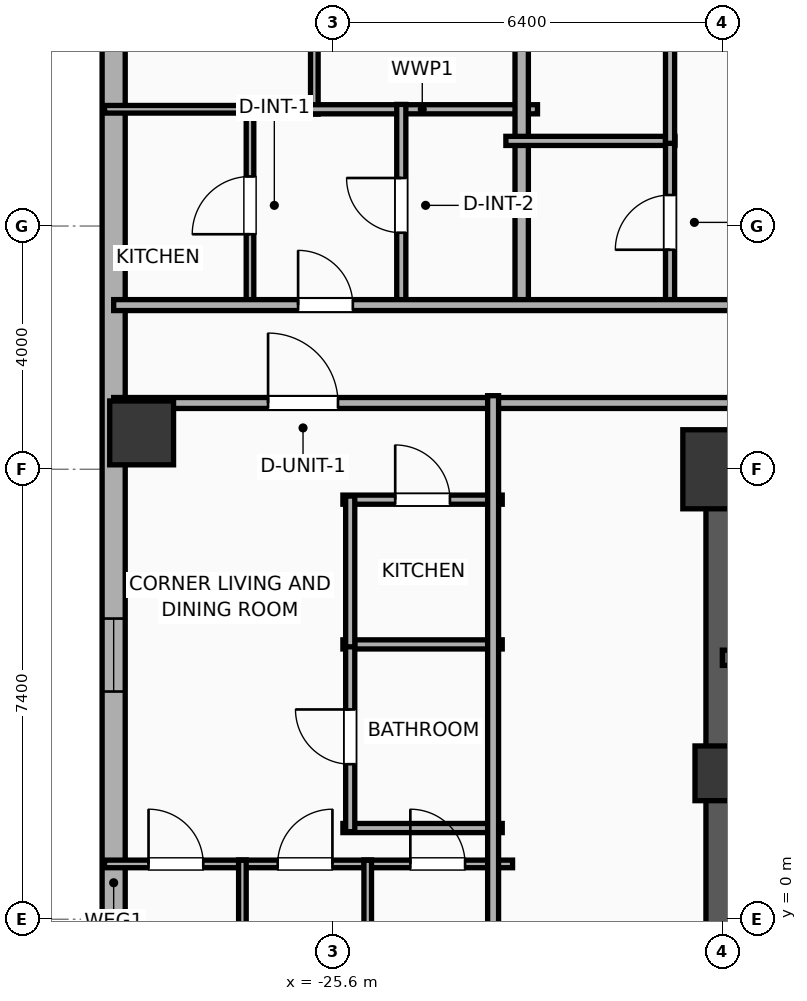
"""IFC4 building model, lengths in metres.
Left out: names, types, materials, properties, quantities, classifications, styles, units other than length and angle.
Written with IfcOpenShell. Run it as: python <this file> out.ifc"""

import sys

from ifc_helpers import new_model, si_unit, direction, frame, frame_2d, origin, origin_2d, place, context, subcontext, project, spatial, rectangle, hollow_rectangle, extrude, element, fill, save


model = new_model("IFC4")
c1 = context("Model", 3, precision=1e-05, world=origin(), true_north=direction((0.0, 1.0)))
c2 = subcontext(c1, "Body", "Model", "MODEL_VIEW")
j1 = project(units=[si_unit("LENGTHUNIT", "METRE"), si_unit("PLANEANGLEUNIT", "RADIAN")], contexts=[c1])
p1 = place(None, origin())
s1 = spatial("IfcSite", under=j1, at=p1, CompositionType="ELEMENT")
p2 = place(p1, origin())
s2 = spatial("IfcBuilding", under=s1, at=p2, CompositionType="ELEMENT")
p3 = place(p2, frame((0.0, 0.0, 128.7)))
s3 = spatial("IfcBuildingStorey", under=s2, at=p3, CompositionType="ELEMENT", Elevation=128.7)
p4 = place(p3, frame((-19.2, 2.4, 0.0), z_axis=(0.0, 0.0, 1.0), x_axis=(1.0, 0.0, 0.0)))
e1 = element("IfcColumn", 1, at=p4, inside=s3, PredefinedType="COLUMN", context=c2, shape_type="SweptSolid", body=[
    extrude(rectangle(XDim=0.9, YDim=0.9, at=origin_2d()), origin(), (0.0, 0.0, 1.0), 3.9),
])
p5 = place(p3, frame((-19.2, 7.4, 0.0), z_axis=(0.0, 0.0, 1.0), x_axis=(1.0, 0.0, 0.0)))
e2 = element("IfcColumn", 2, at=p5, inside=s3, PredefinedType="COLUMN", context=c2, shape_type="SweptSolid", body=[
    extrude(rectangle(XDim=1.3, YDim=1.3, at=origin_2d()), origin(), (0.0, 0.0, 1.0), 3.9),
])
p6 = place(p3, frame((-19.475, 7.4, 0.0), z_axis=(0.0, 0.0, 1.0), x_axis=(1.0, 0.0, 0.0)))
e3 = element("IfcWall", 3, at=p6, inside=s3, PredefinedType="SHEAR", context=c2, shape_type="SweptSolid", body=[
    extrude(rectangle(XDim=7.35, YDim=0.55, at=frame_2d((3.675, 0.0))), origin(), (0.0, 0.0, 1.0), 3.65),
])
p7 = place(p3, frame((-19.145, -7.4, 0.0), z_axis=(0.0, 0.0, 1.0), x_axis=(0.0, 1.0, 0.0)))
e4 = element("IfcWall", 4, at=p7, inside=s3, PredefinedType="SHEAR", context=c2, shape_type="SweptSolid", body=[
    extrude(rectangle(XDim=14.8, YDim=0.65, at=frame_2d((7.4, 0.0))), origin(), (0.0, 0.0, 1.0), 3.65),
])
p8 = place(p3, frame((-28.75, 7.998, 0.0), z_axis=(0.0, 0.0, 1.0), x_axis=(1.0, 0.0, 0.0)))
e5 = element("IfcColumn", 5, at=p8, inside=s3, PredefinedType="COLUMN", context=c2, shape_type="SweptSolid", body=[
    extrude(hollow_rectangle(XDim=1.05, YDim=1.05, WallThickness=0.036, at=origin_2d()), origin(), (0.0, 0.0, 1.0), 3.9),
])
p9 = place(p3, frame((-29.21, -16.581, 0.0), z_axis=(0.0, 0.0, 1.0), x_axis=(0.0, 1.0, 0.0)))
e6 = element("IfcWall", 6, at=p9, inside=s3, PredefinedType="ELEMENTEDWALL", context=c2, shape_type="SweptSolid", body=[
    extrude(rectangle(XDim=34.363, YDim=0.38, at=frame_2d((17.181, 0.0))), origin(), (0.0, 0.0, 1.0), 3.65),
])
p10 = place(p9, frame((31.087, 0.0, 0.75)))
e7 = element("IfcOpeningElement", 7, at=p10, cuts=e6, PredefinedType="OPENING", context=c2, shape_type="SweptSolid", body=[
    extrude(rectangle(XDim=1.2, YDim=2.05, at=frame_2d((0.6, 1.025))), frame((0.0, 0.2, 0.0), z_axis=(0.0, -1.0, 0.0), x_axis=(1.0, 0.0, 0.0)), (0.0, 0.0, 1.0), 0.4),
])
p11 = place(p9, frame((20.326, 0.0, 0.75)))
e8 = element("IfcOpeningElement", 8, at=p11, cuts=e6, PredefinedType="OPENING", context=c2, shape_type="SweptSolid", body=[
    extrude(rectangle(XDim=1.2, YDim=2.05, at=frame_2d((0.6, 1.025))), frame((0.0, 0.2, 0.0), z_axis=(0.0, -1.0, 0.0), x_axis=(1.0, 0.0, 0.0)), (0.0, 0.0, 1.0), 0.4),
])
p12 = place(p9, frame((11.776, 0.0, 0.75)))
e9 = element("IfcOpeningElement", 9, at=p12, cuts=e6, PredefinedType="OPENING", context=c2, shape_type="SweptSolid", body=[
    extrude(rectangle(XDim=1.2, YDim=2.05, at=frame_2d((0.6, 1.025))), frame((0.0, 0.2, 0.0), z_axis=(0.0, -1.0, 0.0), x_axis=(1.0, 0.0, 0.0)), (0.0, 0.0, 1.0), 0.4),
])
p13 = place(p3, frame((-19.2, 4.3, 0.0), z_axis=(0.0, 0.0, 1.0), x_axis=(1.0, 0.0, 0.0)))
e10 = element("IfcWall", 10, at=p13, inside=s3, PredefinedType="SOLIDWALL", context=c2, shape_type="SweptSolid", body=[
    extrude(rectangle(XDim=2.6, YDim=0.25, at=frame_2d((1.3, 0.0))), origin(), (0.0, 0.0, 1.0), 3.65),
])
p14 = place(p3, frame((-29.21, 8.49, 0.0), z_axis=(0.0, 0.0, 1.0), x_axis=(1.0, 0.0, 0.0)))
e11 = element("IfcWall", 11, at=p14, inside=s3, PredefinedType="PARTITIONING", context=c2, shape_type="SweptSolid", body=[
    extrude(rectangle(XDim=19.33, YDim=0.18, at=frame_2d((9.665, 0.0))), origin(), (0.0, 0.0, 1.0), 3.65),
])
p15 = place(p14, frame((2.539, 0.0, 0.0)))
e12 = element("IfcOpeningElement", 12, at=p15, cuts=e11, PredefinedType="OPENING", context=c2, shape_type="SweptSolid", body=[
    extrude(rectangle(XDim=1.15, YDim=2.05, at=frame_2d((0.575, 1.025))), frame((0.0, 0.1, 0.0), z_axis=(0.0, -1.0, 0.0), x_axis=(1.0, 0.0, 0.0)), (0.0, 0.0, 1.0), 0.2),
])
p16 = place(p3, frame((-25.91, 13.24, 0.0), z_axis=(0.0, 0.0, 1.0), x_axis=(0.0, 1.0, 0.0)))
e13 = element("IfcWall", 13, at=p16, inside=s3, PredefinedType="PARTITIONING", context=c2, shape_type="SweptSolid", body=[
    extrude(rectangle(XDim=8.418, YDim=0.125, at=frame_2d((4.209, 0.0))), origin(), (0.0, 0.0, 1.0), 3.65),
])
p17 = place(p16, frame((1.57, 0.0, 0.0)))
e14 = element("IfcOpeningElement", 14, at=p17, cuts=e13, PredefinedType="OPENING", context=c2, shape_type="SweptSolid", body=[
    extrude(rectangle(XDim=0.9, YDim=2.05, at=frame_2d((0.45, 1.025))), frame((0.0, 0.073, 0.0), z_axis=(0.0, -1.0, 0.0), x_axis=(1.0, 0.0, 0.0)), (0.0, 0.0, 1.0), 0.145),
])
p18 = place(p3, frame((-26.03, 13.32, 0.0), z_axis=(0.0, 0.0, 1.0), x_axis=(1.0, 0.0, 0.0)))
e15 = element("IfcWall", 15, at=p18, inside=s3, PredefinedType="PLUMBINGWALL", context=c2, shape_type="SweptSolid", body=[
    extrude(rectangle(XDim=3.79, YDim=0.15, at=frame_2d((1.895, 0.0))), origin(), (0.0, 0.0, 1.0), 3.65),
])
p19 = place(p3, frame((-26.968, 10.08, 0.0), z_axis=(0.0, 0.0, 1.0), x_axis=(0.0, 1.0, 0.0)))
e16 = element("IfcWall", 16, at=p19, inside=s3, PredefinedType="PARTITIONING", context=c2, shape_type="SweptSolid", body=[
    extrude(rectangle(XDim=3.32, YDim=0.125, at=frame_2d((1.66, 0.0))), origin(), (0.0, 0.0, 1.0), 3.65),
])
p20 = place(p19, frame((1.185, 0.0, 0.0)))
e17 = element("IfcOpeningElement", 17, at=p20, cuts=e16, PredefinedType="OPENING", context=c2, shape_type="SweptSolid", body=[
    extrude(rectangle(XDim=0.95, YDim=2.05, at=frame_2d((0.475, 1.025))), frame((0.0, 0.073, 0.0), z_axis=(0.0, -1.0, 0.0), x_axis=(1.0, 0.0, 0.0)), (0.0, 0.0, 1.0), 0.145),
])
p21 = place(p3, frame((-29.36, 13.32, 0.0), z_axis=(0.0, 0.0, 1.0), x_axis=(1.0, 0.0, 0.0)))
e18 = element("IfcWall", 18, at=p21, inside=s3, PredefinedType="PARTITIONING", context=c2, shape_type="SweptSolid", body=[
    extrude(rectangle(XDim=2.512, YDim=0.125, at=frame_2d((1.256, 0.0))), origin(), (0.0, 0.0, 1.0), 3.65),
])
p22 = place(p3, frame((-24.48, 10.08, 0.0), z_axis=(0.0, 0.0, 1.0), x_axis=(0.0, 1.0, 0.0)))
e19 = element("IfcWall", 19, at=p22, inside=s3, PredefinedType="PLUMBINGWALL", context=c2, shape_type="SweptSolid", body=[
    extrude(rectangle(XDim=3.32, YDim=0.15, at=frame_2d((1.66, 0.0))), origin(), (0.0, 0.0, 1.0), 3.65),
])
p23 = place(p22, frame((1.21, 0.0, 0.0)))
e20 = element("IfcOpeningElement", 20, at=p23, cuts=e19, PredefinedType="OPENING", context=c2, shape_type="SweptSolid", body=[
    extrude(rectangle(XDim=0.9, YDim=2.05, at=frame_2d((0.45, 1.025))), frame((0.0, 0.085, 0.0), z_axis=(0.0, -1.0, 0.0), x_axis=(1.0, 0.0, 0.0)), (0.0, 0.0, 1.0), 0.17),
])
p24 = place(p3, frame((-22.5, 10.02, 0.0), z_axis=(0.0, 0.0, 1.0), x_axis=(0.0, 1.0, 0.0)))
e21 = element("IfcWall", 21, at=p24, inside=s3, PredefinedType="PARTITIONING", context=c2, shape_type="SweptSolid", body=[
    extrude(rectangle(XDim=11.59, YDim=0.22, at=frame_2d((5.795, 0.0))), origin(), (0.0, 0.0, 1.0), 3.65),
])
p25 = place(p3, frame((-22.76, 12.8, 0.0), z_axis=(0.0, 0.0, 1.0), x_axis=(1.0, 0.0, 0.0)))
e22 = element("IfcWall", 22, at=p25, inside=s3, PredefinedType="PLUMBINGWALL", context=c2, shape_type="SweptSolid", body=[
    extrude(rectangle(XDim=2.78, YDim=0.15, at=frame_2d((1.39, 0.0))), origin(), (0.0, 0.0, 1.0), 3.65),
])
p26 = place(p3, frame((-20.06, 10.08, 0.0), z_axis=(0.0, 0.0, 1.0), x_axis=(0.0, 1.0, 0.0)))
e23 = element("IfcWall", 23, at=p26, inside=s3, PredefinedType="PLUMBINGWALL", context=c2, shape_type="SweptSolid", body=[
    extrude(rectangle(XDim=2.76, YDim=0.15, at=frame_2d((1.38, 0.0))), origin(), (0.0, 0.0, 1.0), 3.65),
])
p27 = place(p26, frame((0.93, 0.0, 0.0)))
e24 = element("IfcOpeningElement", 24, at=p27, cuts=e23, PredefinedType="OPENING", context=c2, shape_type="SweptSolid", body=[
    extrude(rectangle(XDim=0.9, YDim=2.05, at=frame_2d((0.45, 1.025))), frame((0.0, 0.085, 0.0), z_axis=(0.0, -1.0, 0.0), x_axis=(1.0, 0.0, 0.0)), (0.0, 0.0, 1.0), 0.17),
])
p28 = place(p3, frame((-20.06, 12.76, 0.0), z_axis=(0.0, 0.0, 1.0), x_axis=(0.0, 1.0, 0.0)))
e25 = element("IfcWall", 25, at=p28, inside=s3, PredefinedType="PLUMBINGWALL", context=c2, shape_type="SweptSolid", body=[
    extrude(rectangle(XDim=8.898, YDim=0.15, at=frame_2d((4.449, 0.0))), origin(), (0.0, 0.0, 1.0), 3.65),
])
p29 = place(p28, frame((3.999, 0.0, 0.0)))
e26 = element("IfcOpeningElement", 26, at=p29, cuts=e25, PredefinedType="OPENING", context=c2, shape_type="SweptSolid", body=[
    extrude(rectangle(XDim=0.9, YDim=2.05, at=frame_2d((0.45, 1.025))), frame((0.0, 0.085, 0.0), z_axis=(0.0, -1.0, 0.0), x_axis=(1.0, 0.0, 0.0)), (0.0, 0.0, 1.0), 0.17),
])
p30 = place(p3, frame((-29.21, 10.1, 0.0), z_axis=(0.0, 0.0, 1.0), x_axis=(1.0, 0.0, 0.0)))
e27 = element("IfcWall", 27, at=p30, inside=s3, PredefinedType="PARTITIONING", context=c2, shape_type="SweptSolid", body=[
    extrude(rectangle(XDim=62.42, YDim=0.18, at=frame_2d((31.21, 0.0))), origin(), (0.0, 0.0, 1.0), 3.65),
])
p31 = place(p30, frame((3.033, 0.0, 0.0)))
e28 = element("IfcOpeningElement", 28, at=p31, cuts=e27, PredefinedType="OPENING", context=c2, shape_type="SweptSolid", body=[
    extrude(rectangle(XDim=0.9, YDim=2.05, at=frame_2d((0.45, 1.025))), frame((0.0, 0.1, 0.0), z_axis=(0.0, -1.0, 0.0), x_axis=(1.0, 0.0, 0.0)), (0.0, 0.0, 1.0), 0.2),
])
p32 = place(p30, frame((10.573, 0.0, 0.0)))
e29 = element("IfcOpeningElement", 29, at=p32, cuts=e27, PredefinedType="OPENING", context=c2, shape_type="SweptSolid", body=[
    extrude(rectangle(XDim=1.15, YDim=2.05, at=frame_2d((0.575, 1.025))), frame((0.0, 0.1, 0.0), z_axis=(0.0, -1.0, 0.0), x_axis=(1.0, 0.0, 0.0)), (0.0, 0.0, 1.0), 0.2),
])
p33 = place(p30, frame((16.135, 0.0, 0.0)))
e30 = element("IfcOpeningElement", 30, at=p33, cuts=e27, PredefinedType="OPENING", context=c2, shape_type="SweptSolid", body=[
    extrude(rectangle(XDim=0.9, YDim=2.05, at=frame_2d((0.45, 1.025))), frame((0.0, 0.1, 0.0), z_axis=(0.0, -1.0, 0.0), x_axis=(1.0, 0.0, 0.0)), (0.0, 0.0, 1.0), 0.2),
])
p34 = place(p30, frame((23.632, 0.0, 0.0)))
e31 = element("IfcOpeningElement", 31, at=p34, cuts=e27, PredefinedType="OPENING", context=c2, shape_type="SweptSolid", body=[
    extrude(rectangle(XDim=1.15, YDim=2.05, at=frame_2d((0.575, 1.025))), frame((0.0, 0.1, 0.0), z_axis=(0.0, -1.0, 0.0), x_axis=(1.0, 0.0, 0.0)), (0.0, 0.0, 1.0), 0.2),
])
p35 = place(p30, frame((27.751, 0.0, 0.0)))
e32 = element("IfcOpeningElement", 32, at=p35, cuts=e27, PredefinedType="OPENING", context=c2, shape_type="SweptSolid", body=[
    extrude(rectangle(XDim=1.15, YDim=2.05, at=frame_2d((0.575, 1.025))), frame((0.0, 0.1, 0.0), z_axis=(0.0, -1.0, 0.0), x_axis=(1.0, 0.0, 0.0)), (0.0, 0.0, 1.0), 0.2),
])
p36 = place(p30, frame((35.635, 0.0, 0.0)))
e33 = element("IfcOpeningElement", 33, at=p36, cuts=e27, PredefinedType="OPENING", context=c2, shape_type="SweptSolid", body=[
    extrude(rectangle(XDim=0.9, YDim=2.05, at=frame_2d((0.45, 1.025))), frame((0.0, 0.1, 0.0), z_axis=(0.0, -1.0, 0.0), x_axis=(1.0, 0.0, 0.0)), (0.0, 0.0, 1.0), 0.2),
])
p37 = place(p30, frame((40.697, 0.0, 0.0)))
e34 = element("IfcOpeningElement", 34, at=p37, cuts=e27, PredefinedType="OPENING", context=c2, shape_type="SweptSolid", body=[
    extrude(rectangle(XDim=1.15, YDim=2.05, at=frame_2d((0.575, 1.025))), frame((0.0, 0.1, 0.0), z_axis=(0.0, -1.0, 0.0), x_axis=(1.0, 0.0, 0.0)), (0.0, 0.0, 1.0), 0.2),
])
p38 = place(p30, frame((48.637, 0.0, 0.0)))
e35 = element("IfcOpeningElement", 35, at=p38, cuts=e27, PredefinedType="OPENING", context=c2, shape_type="SweptSolid", body=[
    extrude(rectangle(XDim=0.9, YDim=2.05, at=frame_2d((0.45, 1.025))), frame((0.0, 0.1, 0.0), z_axis=(0.0, -1.0, 0.0), x_axis=(1.0, 0.0, 0.0)), (0.0, 0.0, 1.0), 0.2),
])
p39 = place(p30, frame((57.213, 0.0, 0.0)))
e36 = element("IfcOpeningElement", 36, at=p39, cuts=e27, PredefinedType="OPENING", context=c2, shape_type="SweptSolid", body=[
    extrude(rectangle(XDim=1.15, YDim=2.05, at=frame_2d((0.575, 1.025))), frame((0.0, 0.1, 0.0), z_axis=(0.0, -1.0, 0.0), x_axis=(1.0, 0.0, 0.0)), (0.0, 0.0, 1.0), 0.2),
])
p40 = place(p3, frame((-25.44, 6.9, 0.0), z_axis=(0.0, 0.0, 1.0), x_axis=(1.0, 0.0, 0.0)))
e37 = element("IfcWall", 37, at=p40, inside=s3, PredefinedType="PLUMBINGWALL", context=c2, shape_type="SweptSolid", body=[
    extrude(rectangle(XDim=2.62, YDim=0.15, at=frame_2d((1.31, 0.0))), origin(), (0.0, 0.0, 1.0), 3.65),
])
p41 = place(p40, frame((0.86, 0.0, 0.0)))
e38 = element("IfcOpeningElement", 38, at=p41, cuts=e37, PredefinedType="OPENING", context=c2, shape_type="SweptSolid", body=[
    extrude(rectangle(XDim=0.9, YDim=2.05, at=frame_2d((0.45, 1.025))), frame((0.0, 0.085, 0.0), z_axis=(0.0, -1.0, 0.0), x_axis=(1.0, 0.0, 0.0)), (0.0, 0.0, 1.0), 0.17),
])
for number, where, z_axis, x_axis in (
    (39, (-25.44, 4.52, 0.0), (0.0, 0.0, 1.0), (1.0, 0.0, 0.0)),
    (40, (-25.44, 1.5, 0.0), (0.0, 0.0, 1.0), (1.0, 0.0, 0.0)),
):
    element("IfcWall", number, at=place(p3, frame(where, z_axis=z_axis, x_axis=x_axis)), inside=s3, PredefinedType="PLUMBINGWALL", context=c2, shape_type="SweptSolid", body=[
        extrude(rectangle(XDim=2.62, YDim=0.15, at=frame_2d((1.31, 0.0))), origin(), (0.0, 0.0, 1.0), 3.65),
    ])
p42 = place(p3, frame((-25.32, 1.44, 0.0), z_axis=(0.0, 0.0, 1.0), x_axis=(0.0, 1.0, 0.0)))
e41 = element("IfcWall", 41, at=p42, inside=s3, PredefinedType="PLUMBINGWALL", context=c2, shape_type="SweptSolid", body=[
    extrude(rectangle(XDim=3.12, YDim=0.15, at=frame_2d((1.56, 0.0))), origin(), (0.0, 0.0, 1.0), 3.65),
])
p43 = place(p42, frame((1.11, 0.0, 0.0)))
e42 = element("IfcOpeningElement", 42, at=p43, cuts=e41, PredefinedType="OPENING", context=c2, shape_type="SweptSolid", body=[
    extrude(rectangle(XDim=0.9, YDim=2.05, at=frame_2d((0.45, 1.025))), frame((0.0, 0.085, 0.0), z_axis=(0.0, -1.0, 0.0), x_axis=(1.0, 0.0, 0.0)), (0.0, 0.0, 1.0), 0.17),
])
p44 = place(p3, frame((-25.32, 4.48, 0.0), z_axis=(0.0, 0.0, 1.0), x_axis=(0.0, 1.0, 0.0)))
e43 = element("IfcWall", 43, at=p44, inside=s3, PredefinedType="PLUMBINGWALL", context=c2, shape_type="SweptSolid", body=[
    extrude(rectangle(XDim=2.48, YDim=0.15, at=frame_2d((1.24, 0.0))), origin(), (0.0, 0.0, 1.0), 3.65),
])
p45 = place(p3, frame((-29.36, 0.91, 0.0), z_axis=(0.0, 0.0, 1.0), x_axis=(1.0, 0.0, 0.0)))
e44 = element("IfcWall", 44, at=p45, inside=s3, PredefinedType="PARTITIONING", context=c2, shape_type="SweptSolid", body=[
    extrude(rectangle(XDim=2.33, YDim=0.125, at=frame_2d((1.165, 0.0))), origin(), (0.0, 0.0, 1.0), 3.65),
])
p46 = place(p45, frame((0.723, 0.0, 0.0)))
e45 = element("IfcOpeningElement", 45, at=p46, cuts=e44, PredefinedType="OPENING", context=c2, shape_type="SweptSolid", body=[
    extrude(rectangle(XDim=0.9, YDim=2.05, at=frame_2d((0.45, 1.025))), frame((0.0, 0.073, 0.0), z_axis=(0.0, -1.0, 0.0), x_axis=(1.0, 0.0, 0.0)), (0.0, 0.0, 1.0), 0.145),
])
p47 = place(p3, frame((-27.156, 0.91, 0.0), z_axis=(0.0, 0.0, 1.0), x_axis=(1.0, 0.0, 0.0)))
e46 = element("IfcWall", 46, at=p47, inside=s3, PredefinedType="PARTITIONING", context=c2, shape_type="SweptSolid", body=[
    extrude(rectangle(XDim=2.186, YDim=0.125, at=frame_2d((1.093, 0.0))), origin(), (0.0, 0.0, 1.0), 3.65),
])
p48 = place(p47, frame((0.643, 0.0, 0.0)))
e47 = element("IfcOpeningElement", 47, at=p48, cuts=e46, PredefinedType="OPENING", context=c2, shape_type="SweptSolid", body=[
    extrude(rectangle(XDim=0.9, YDim=2.05, at=frame_2d((0.45, 1.025))), frame((0.0, 0.073, 0.0), z_axis=(0.0, -1.0, 0.0), x_axis=(1.0, 0.0, 0.0)), (0.0, 0.0, 1.0), 0.145),
])
p49 = place(p3, frame((-25.094, 0.91, 0.0), z_axis=(0.0, 0.0, 1.0), x_axis=(1.0, 0.0, 0.0)))
e48 = element("IfcWall", 48, at=p49, inside=s3, PredefinedType="PARTITIONING", context=c2, shape_type="SweptSolid", body=[
    extrude(rectangle(XDim=2.445, YDim=0.125, at=frame_2d((1.222, 0.0))), origin(), (0.0, 0.0, 1.0), 3.65),
])
p50 = place(p49, frame((0.763, 0.0, 0.0)))
e49 = element("IfcOpeningElement", 49, at=p50, cuts=e48, PredefinedType="OPENING", context=c2, shape_type="SweptSolid", body=[
    extrude(rectangle(XDim=0.9, YDim=2.05, at=frame_2d((0.45, 1.025))), frame((0.0, 0.073, 0.0), z_axis=(0.0, -1.0, 0.0), x_axis=(1.0, 0.0, 0.0)), (0.0, 0.0, 1.0), 0.145),
])
for number, where, z_axis, x_axis in (
    (50, (-25.032, -8.81, 0.0), (0.0, 0.0, 1.0), (0.0, 1.0, 0.0)),
    (51, (-27.093, -8.81, 0.0), (0.0, 0.0, 1.0), (0.0, 1.0, 0.0)),
):
    element("IfcWall", number, at=place(p3, frame(where, z_axis=z_axis, x_axis=x_axis)), inside=s3, PredefinedType="PARTITIONING", context=c2, shape_type="SweptSolid", body=[
        extrude(rectangle(XDim=9.78, YDim=0.125, at=frame_2d((4.89, 0.0))), origin(), (0.0, 0.0, 1.0), 3.65),
    ])
p51 = place(p3, frame((-22.97, -8.61, 0.0), z_axis=(0.0, 0.0, 1.0), x_axis=(0.0, 1.0, 0.0)))
e52 = element("IfcWall", 52, at=p51, inside=s3, PredefinedType="PARTITIONING", context=c2, shape_type="SweptSolid", body=[
    extrude(rectangle(XDim=17.22, YDim=0.18, at=frame_2d((8.61, 0.0))), origin(), (0.0, 0.0, 1.0), 3.65),
])
p52 = place(p11, origin())
e53 = element("IfcWindow", 53, at=p52, inside=s3, PartitioningType="SINGLE_PANEL", PredefinedType="WINDOW", context=c2, shape_type="SweptSolid", body=[
    extrude(rectangle(XDim=1.2, YDim=2.05, at=frame_2d((0.6, 1.025))), frame((0.0, 0.03, 0.0), z_axis=(0.0, -1.0, 0.0), x_axis=(1.0, 0.0, 0.0)), (0.0, 0.0, 1.0), 0.06),
])
fill(e8, e53)
p53 = place(p15, origin())
e54 = element("IfcDoor", 54, at=p53, inside=s3, OperationType="SINGLE_SWING_LEFT", PredefinedType="DOOR", context=c2, shape_type="SweptSolid", body=[
    extrude(rectangle(XDim=1.15, YDim=2.05, at=frame_2d((0.575, 1.025))), frame((0.0, 0.025, 0.0), z_axis=(0.0, -1.0, 0.0), x_axis=(1.0, 0.0, 0.0)), (0.0, 0.0, 1.0), 0.05),
])
fill(e12, e54)
p54 = place(p20, origin())
e55 = element("IfcDoor", 55, at=p54, inside=s3, OperationType="SINGLE_SWING_LEFT", PredefinedType="DOOR", context=c2, shape_type="SweptSolid", body=[
    extrude(rectangle(XDim=0.95, YDim=2.05, at=frame_2d((0.475, 1.025))), frame((0.0, 0.025, 0.0), z_axis=(0.0, -1.0, 0.0), x_axis=(1.0, 0.0, 0.0)), (0.0, 0.0, 1.0), 0.05),
])
fill(e17, e55)
p55 = place(p23, origin())
e56 = element("IfcDoor", 56, at=p55, inside=s3, OperationType="SINGLE_SWING_RIGHT", PredefinedType="DOOR", context=c2, shape_type="SweptSolid", body=[
    extrude(rectangle(XDim=0.9, YDim=2.05, at=frame_2d((0.45, 1.025))), frame((0.0, 0.025, 0.0), z_axis=(0.0, -1.0, 0.0), x_axis=(1.0, 0.0, 0.0)), (0.0, 0.0, 1.0), 0.05),
])
fill(e20, e56)
p56 = place(p27, origin())
e57 = element("IfcDoor", 57, at=p56, inside=s3, OperationType="SINGLE_SWING_LEFT", PredefinedType="DOOR", context=c2, shape_type="SweptSolid", body=[
    extrude(rectangle(XDim=0.9, YDim=2.05, at=frame_2d((0.45, 1.025))), frame((0.0, 0.025, 0.0), z_axis=(0.0, -1.0, 0.0), x_axis=(1.0, 0.0, 0.0)), (0.0, 0.0, 1.0), 0.05),
])
fill(e24, e57)
p57 = place(p31, origin())
e58 = element("IfcDoor", 58, at=p57, inside=s3, OperationType="SINGLE_SWING_LEFT", PredefinedType="DOOR", context=c2, shape_type="SweptSolid", body=[
    extrude(rectangle(XDim=0.9, YDim=2.05, at=frame_2d((0.45, 1.025))), frame((0.0, 0.025, 0.0), z_axis=(0.0, -1.0, 0.0), x_axis=(1.0, 0.0, 0.0)), (0.0, 0.0, 1.0), 0.05),
])
fill(e28, e58)
p58 = place(p41, origin())
e59 = element("IfcDoor", 59, at=p58, inside=s3, OperationType="SINGLE_SWING_LEFT", PredefinedType="DOOR", context=c2, shape_type="SweptSolid", body=[
    extrude(rectangle(XDim=0.9, YDim=2.05, at=frame_2d((0.45, 1.025))), frame((0.0, 0.025, 0.0), z_axis=(0.0, -1.0, 0.0), x_axis=(1.0, 0.0, 0.0)), (0.0, 0.0, 1.0), 0.05),
])
fill(e38, e59)
p59 = place(p43, origin())
e60 = element("IfcDoor", 60, at=p59, inside=s3, OperationType="SINGLE_SWING_RIGHT", PredefinedType="DOOR", context=c2, shape_type="SweptSolid", body=[
    extrude(rectangle(XDim=0.9, YDim=2.05, at=frame_2d((0.45, 1.025))), frame((0.0, 0.025, 0.0), z_axis=(0.0, -1.0, 0.0), x_axis=(1.0, 0.0, 0.0)), (0.0, 0.0, 1.0), 0.05),
])
fill(e42, e60)
p60 = place(p46, origin())
e61 = element("IfcDoor", 61, at=p60, inside=s3, OperationType="SINGLE_SWING_LEFT", PredefinedType="DOOR", context=c2, shape_type="SweptSolid", body=[
    extrude(rectangle(XDim=0.9, YDim=2.05, at=frame_2d((0.45, 1.025))), frame((0.0, 0.025, 0.0), z_axis=(0.0, -1.0, 0.0), x_axis=(1.0, 0.0, 0.0)), (0.0, 0.0, 1.0), 0.05),
])
fill(e45, e61)
p61 = place(p48, origin())
e62 = element("IfcDoor", 62, at=p61, inside=s3, OperationType="SINGLE_SWING_RIGHT", PredefinedType="DOOR", context=c2, shape_type="SweptSolid", body=[
    extrude(rectangle(XDim=0.9, YDim=2.05, at=frame_2d((0.45, 1.025))), frame((0.0, 0.025, 0.0), z_axis=(0.0, -1.0, 0.0), x_axis=(1.0, 0.0, 0.0)), (0.0, 0.0, 1.0), 0.05),
])
fill(e47, e62)
p62 = place(p50, origin())
e63 = element("IfcDoor", 63, at=p62, inside=s3, OperationType="SINGLE_SWING_LEFT", PredefinedType="DOOR", context=c2, shape_type="SweptSolid", body=[
    extrude(rectangle(XDim=0.9, YDim=2.05, at=frame_2d((0.45, 1.025))), frame((0.0, 0.025, 0.0), z_axis=(0.0, -1.0, 0.0), x_axis=(1.0, 0.0, 0.0)), (0.0, 0.0, 1.0), 0.05),
])
fill(e49, e63)
save(model, sys.argv[1])
